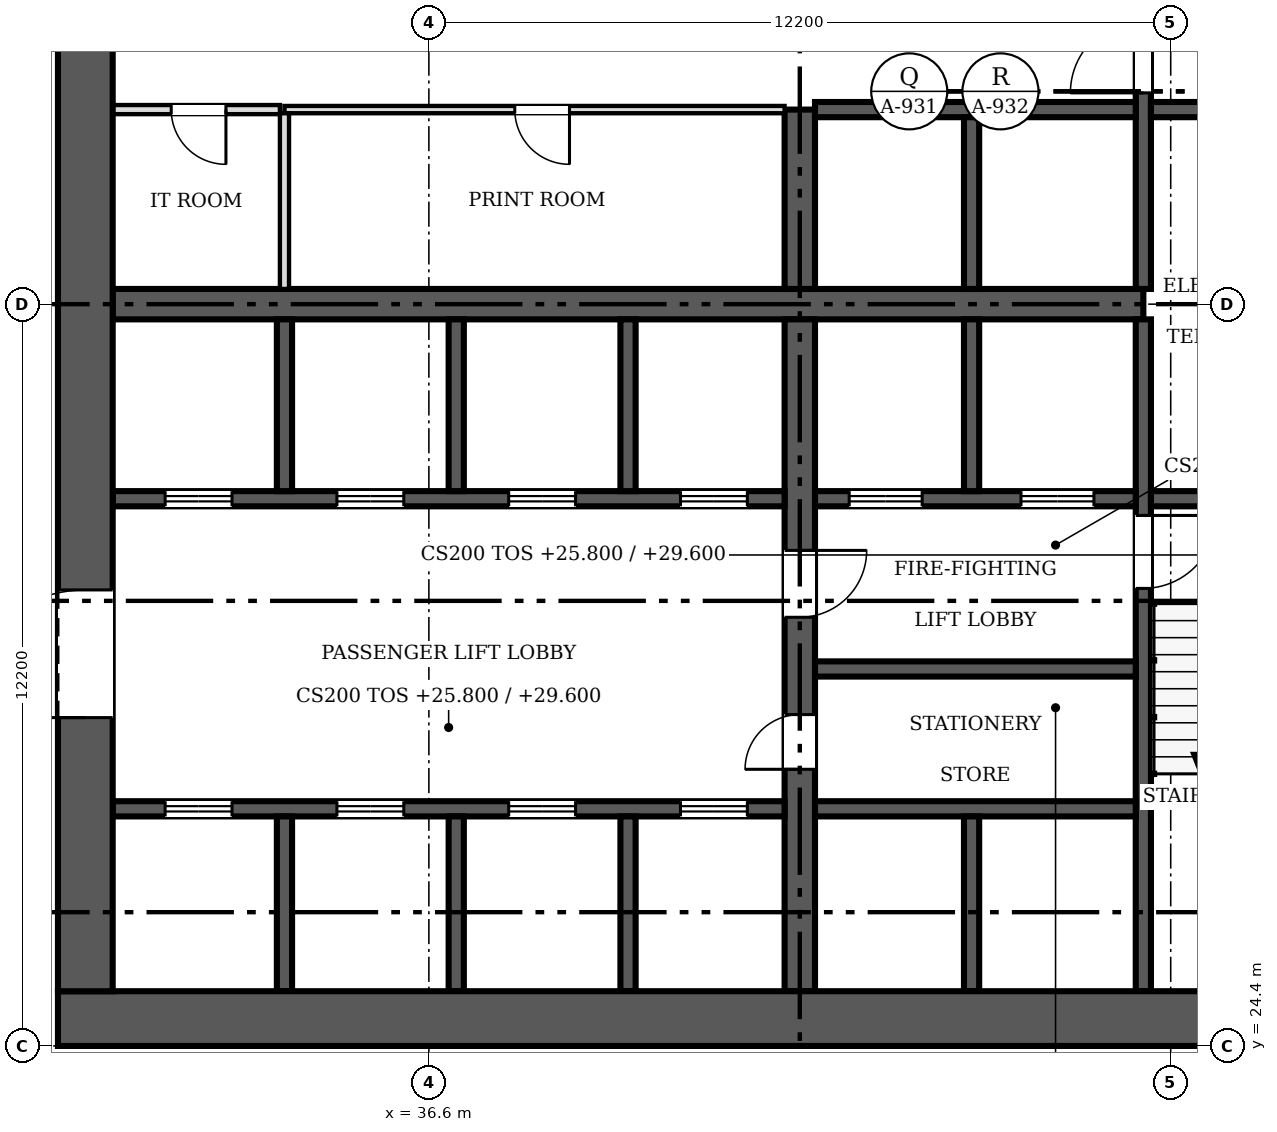
"""IFC4 building model, lengths in metres.
Left out: names, types, materials, properties, quantities, classifications, styles, units other than length and angle.
Written with IfcOpenShell. Run it as: python <this file> out.ifc"""

import sys

from ifc_helpers import new_model, si_unit, direction, frame, frame_2d, origin, place, context, subcontext, project, spatial, rectangle, extrude, source, transform, mapped, element, fill, save


model = new_model("IFC4")
c1 = context("Model", 3, precision=1e-05, world=origin(), true_north=direction((0.0, 1.0)))
c2 = subcontext(c1, "Body", "Model", "MODEL_VIEW")
j1 = project(units=[si_unit("LENGTHUNIT", "METRE"), si_unit("PLANEANGLEUNIT", "RADIAN")], contexts=[c1])
p1 = place(None, origin())
s1 = spatial("IfcSite", under=j1, at=p1, CompositionType="ELEMENT")
p2 = place(p1, origin())
s2 = spatial("IfcBuilding", under=s1, at=p2, CompositionType="ELEMENT")
p3 = place(p2, frame((0.0, 0.0, 25.8)))
s3 = spatial("IfcBuildingStorey", under=s2, at=p3, CompositionType="ELEMENT", Elevation=25.8)
p4 = place(p3, frame((54.9, 24.85, 0.0), z_axis=(0.0, 0.0, 1.0), x_axis=(-1.0, 0.0, 0.0)))
e1 = element("IfcWall", 1, at=p4, inside=s3, PredefinedType="SHEAR", context=c2, shape_type="SweptSolid", body=[
    extrude(rectangle(XDim=24.4, YDim=0.9, at=frame_2d((12.2, 0.0))), origin(), (0.0, 0.0, 1.0), 3.8),
])
m1 = source(origin(), c2, "Body", "SweptSolid", [
    extrude(rectangle(XDim=1.2, YDim=2.1, at=frame_2d((0.6, 1.05))), frame((0.0, 0.46, 0.0), z_axis=(0.0, -1.0, 0.0), x_axis=(1.0, 0.0, 0.0)), (0.0, 0.0, 1.0), 0.92),
])
p5 = place(p4, frame((1.5, 0.0, 0.0)))
e2 = element("IfcOpeningElement", 2, at=p5, cuts=e1, PredefinedType="OPENING", context=c2, shape_type="MappedRepresentation", body=[
    mapped(m1, transform((0.0, 0.0, 0.0), scale=1.0)),
])
p6 = place(p3, frame((30.95, 25.3, 0.0), z_axis=(0.0, 0.0, 1.0), x_axis=(0.0, 1.0, 0.0)))
e3 = element("IfcWall", 3, at=p6, inside=s3, PredefinedType="SHEAR", context=c2, shape_type="SweptSolid", body=[
    extrude(rectangle(XDim=22.6, YDim=0.9, at=frame_2d((11.3, 0.0))), origin(), (0.0, 0.0, 1.0), 3.8),
])
m2 = source(origin(), c2, "Body", "SweptSolid", [
    extrude(rectangle(XDim=2.1, YDim=2.4, at=frame_2d((1.05, 1.2))), frame((0.0, 0.46, 0.0), z_axis=(0.0, -1.0, 0.0), x_axis=(1.0, 0.0, 0.0)), (0.0, 0.0, 1.0), 0.92),
])
p7 = place(p6, frame((4.5, 0.0, 0.0)))
e4 = element("IfcOpeningElement", 4, at=p7, cuts=e3, PredefinedType="OPENING", context=c2, shape_type="MappedRepresentation", body=[
    mapped(m2, transform((0.0, 0.0, 0.0), scale=1.0)),
])
p8 = place(p6, frame((16.0, 0.0, 0.0)))
e5 = element("IfcOpeningElement", 5, at=p8, cuts=e3, PredefinedType="OPENING", context=c2, shape_type="MappedRepresentation", body=[
    mapped(m2, transform((0.0, 0.0, 0.0), scale=1.0)),
])
p9 = place(p3, frame((31.4, 36.6, 0.0), z_axis=(0.0, 0.0, 1.0), x_axis=(1.0, 0.0, 0.0)))
e6 = element("IfcWall", 6, at=p9, inside=s3, PredefinedType="SHEAR", context=c2, shape_type="SweptSolid", body=[
    extrude(rectangle(XDim=16.95, YDim=0.5, at=frame_2d((8.475, 0.0))), origin(), (0.0, 0.0, 1.0), 3.8),
])
p10 = place(p3, frame((42.7, 36.35, 0.0), z_axis=(0.0, 0.0, 1.0), x_axis=(0.0, -1.0, 0.0)))
e7 = element("IfcWall", 7, at=p10, inside=s3, PredefinedType="SHEAR", context=c2, shape_type="SweptSolid", body=[
    extrude(rectangle(XDim=11.05, YDim=0.5, at=frame_2d((5.525, 0.0))), origin(), (0.0, 0.0, 1.0), 3.8),
])
m3 = source(origin(), c2, "Body", "SweptSolid", [
    extrude(rectangle(XDim=0.9, YDim=2.1, at=frame_2d((0.45, 1.05))), frame((0.0, 0.26, 0.0), z_axis=(0.0, -1.0, 0.0), x_axis=(1.0, 0.0, 0.0)), (0.0, 0.0, 1.0), 0.52),
])
p11 = place(p10, frame((6.5, 0.0, 0.0)))
e8 = element("IfcOpeningElement", 8, at=p11, cuts=e7, PredefinedType="OPENING", context=c2, shape_type="MappedRepresentation", body=[
    mapped(m3, transform((0.0, 0.0, 0.0), scale=1.0)),
])
m4 = source(origin(), c2, "Body", "SweptSolid", [
    extrude(rectangle(XDim=1.1, YDim=2.1, at=frame_2d((0.55, 1.05))), frame((0.0, 0.26, 0.0), z_axis=(0.0, -1.0, 0.0), x_axis=(1.0, 0.0, 0.0)), (0.0, 0.0, 1.0), 0.52),
])
p12 = place(p10, frame((3.8, 0.0, 0.0)))
e9 = element("IfcOpeningElement", 9, at=p12, cuts=e7, PredefinedType="OPENING", context=c2, shape_type="MappedRepresentation", body=[
    mapped(m4, transform((0.0, 0.0, 0.0), scale=1.0)),
])
p13 = place(p3, frame((42.7, 36.85, 0.0), z_axis=(0.0, 0.0, 1.0), x_axis=(0.0, 1.0, 0.0)))
e10 = element("IfcWall", 10, at=p13, inside=s3, PredefinedType="SHEAR", context=c2, shape_type="SweptSolid", body=[
    extrude(rectangle(XDim=2.95, YDim=0.5, at=frame_2d((1.475, 0.0))), origin(), (0.0, 0.0, 1.0), 3.8),
])
p14 = place(p3, frame((48.35, 36.35, 0.0), z_axis=(0.0, 0.0, 1.0), x_axis=(0.0, -1.0, 0.0)))
e11 = element("IfcWall", 11, at=p14, inside=s3, PredefinedType="SOLIDWALL", context=c2, shape_type="SweptSolid", body=[
    extrude(rectangle(XDim=11.05, YDim=0.25, at=frame_2d((5.525, 0.0))), origin(), (0.0, 0.0, 1.0), 3.8),
])
m5 = source(origin(), c2, "Body", "SweptSolid", [
    extrude(rectangle(XDim=1.2, YDim=2.1, at=frame_2d((0.6, 1.05))), frame((0.0, 0.135, 0.0), z_axis=(0.0, -1.0, 0.0), x_axis=(1.0, 0.0, 0.0)), (0.0, 0.0, 1.0), 0.27),
])
p15 = place(p14, frame((3.225, 0.0, 0.0)))
e12 = element("IfcOpeningElement", 12, at=p15, cuts=e11, PredefinedType="OPENING", context=c2, shape_type="MappedRepresentation", body=[
    mapped(m5, transform((0.0, 0.0, 0.0), scale=1.0)),
])
p16 = place(p3, frame((48.35, 47.9, 0.0), z_axis=(0.0, 0.0, 1.0), x_axis=(0.0, -1.0, 0.0)))
e13 = element("IfcWall", 13, at=p16, inside=s3, PredefinedType="SOLIDWALL", context=c2, shape_type="SweptSolid", body=[
    extrude(rectangle(XDim=11.05, YDim=0.25, at=frame_2d((5.525, 0.0))), origin(), (0.0, 0.0, 1.0), 3.8),
])
p17 = place(p16, frame((6.625, 0.0, 0.0)))
e14 = element("IfcOpeningElement", 14, at=p17, cuts=e13, PredefinedType="OPENING", context=c2, shape_type="MappedRepresentation", body=[
    mapped(m5, transform((0.0, 0.0, 0.0), scale=1.0)),
])
p18 = place(p3, frame((42.45, 33.4, 0.0), z_axis=(0.0, 0.0, 1.0), x_axis=(-1.0, 0.0, 0.0)))
e15 = element("IfcWall", 15, at=p18, inside=s3, PredefinedType="SOLIDWALL", context=c2, shape_type="SweptSolid", body=[
    extrude(rectangle(XDim=11.05, YDim=0.25, at=frame_2d((5.525, 0.0))), origin(), (0.0, 0.0, 1.0), 3.8),
])
m6 = source(origin(), c2, "Body", "SweptSolid", [
    extrude(rectangle(XDim=1.1, YDim=2.1, at=frame_2d((0.55, 1.05))), frame((0.0, 0.135, 0.0), z_axis=(0.0, -1.0, 0.0), x_axis=(1.0, 0.0, 0.0)), (0.0, 0.0, 1.0), 0.27),
])
p19 = place(p18, frame((9.087, 0.0, 0.0)))
e16 = element("IfcOpeningElement", 16, at=p19, cuts=e15, PredefinedType="OPENING", context=c2, shape_type="MappedRepresentation", body=[
    mapped(m6, transform((0.0, 0.0, 0.0), scale=1.0)),
])
p20 = place(p18, frame((6.262, 0.0, 0.0)))
e17 = element("IfcOpeningElement", 17, at=p20, cuts=e15, PredefinedType="OPENING", context=c2, shape_type="MappedRepresentation", body=[
    mapped(m6, transform((0.0, 0.0, 0.0), scale=1.0)),
])
p21 = place(p18, frame((3.438, 0.0, 0.0)))
e18 = element("IfcOpeningElement", 18, at=p21, cuts=e15, PredefinedType="OPENING", context=c2, shape_type="MappedRepresentation", body=[
    mapped(m6, transform((0.0, 0.0, 0.0), scale=1.0)),
])
p22 = place(p18, frame((0.613, 0.0, 0.0)))
e19 = element("IfcOpeningElement", 19, at=p22, cuts=e15, PredefinedType="OPENING", context=c2, shape_type="MappedRepresentation", body=[
    mapped(m6, transform((0.0, 0.0, 0.0), scale=1.0)),
])
p23 = place(p3, frame((48.225, 33.4, 0.0), z_axis=(0.0, 0.0, 1.0), x_axis=(-1.0, 0.0, 0.0)))
e20 = element("IfcWall", 20, at=p23, inside=s3, PredefinedType="SOLIDWALL", context=c2, shape_type="SweptSolid", body=[
    extrude(rectangle(XDim=5.275, YDim=0.25, at=frame_2d((2.638, 0.0))), origin(), (0.0, 0.0, 1.0), 3.8),
])
p24 = place(p23, frame((3.512, 0.0, 0.0)))
e21 = element("IfcOpeningElement", 21, at=p24, cuts=e20, PredefinedType="OPENING", context=c2, shape_type="MappedRepresentation", body=[
    mapped(m5, transform((0.0, 0.0, 0.0), scale=1.0)),
])
p25 = place(p23, frame((0.688, 0.0, 0.0)))
e22 = element("IfcOpeningElement", 22, at=p25, cuts=e20, PredefinedType="OPENING", context=c2, shape_type="MappedRepresentation", body=[
    mapped(m5, transform((0.0, 0.0, 0.0), scale=1.0)),
])
p26 = place(p3, frame((48.475, 33.4, 0.0), z_axis=(0.0, 0.0, 1.0), x_axis=(1.0, 0.0, 0.0)))
e23 = element("IfcWall", 23, at=p26, inside=s3, PredefinedType="SOLIDWALL", context=c2, shape_type="SweptSolid", body=[
    extrude(rectangle(XDim=3.525, YDim=0.25, at=frame_2d((1.762, 0.0))), origin(), (0.0, 0.0, 1.0), 3.8),
])
p27 = place(p3, frame((31.4, 28.3, 0.0), z_axis=(0.0, 0.0, 1.0), x_axis=(1.0, 0.0, 0.0)))
e24 = element("IfcWall", 24, at=p27, inside=s3, PredefinedType="SOLIDWALL", context=c2, shape_type="SweptSolid", body=[
    extrude(rectangle(XDim=11.05, YDim=0.25, at=frame_2d((5.525, 0.0))), origin(), (0.0, 0.0, 1.0), 3.8),
])
p28 = place(p27, frame((0.863, 0.0, 0.0)))
e25 = element("IfcOpeningElement", 25, at=p28, cuts=e24, PredefinedType="OPENING", context=c2, shape_type="MappedRepresentation", body=[
    mapped(m6, transform((0.0, 0.0, 0.0), scale=1.0)),
])
p29 = place(p27, frame((3.688, 0.0, 0.0)))
e26 = element("IfcOpeningElement", 26, at=p29, cuts=e24, PredefinedType="OPENING", context=c2, shape_type="MappedRepresentation", body=[
    mapped(m6, transform((0.0, 0.0, 0.0), scale=1.0)),
])
p30 = place(p27, frame((6.512, 0.0, 0.0)))
e27 = element("IfcOpeningElement", 27, at=p30, cuts=e24, PredefinedType="OPENING", context=c2, shape_type="MappedRepresentation", body=[
    mapped(m6, transform((0.0, 0.0, 0.0), scale=1.0)),
])
p31 = place(p27, frame((9.337, 0.0, 0.0)))
e28 = element("IfcOpeningElement", 28, at=p31, cuts=e24, PredefinedType="OPENING", context=c2, shape_type="MappedRepresentation", body=[
    mapped(m6, transform((0.0, 0.0, 0.0), scale=1.0)),
])
for number, where, z_axis, x_axis in (
    (29, (42.95, 28.3, 0.0), (0.0, 0.0, 1.0), (1.0, 0.0, 0.0)),
    (30, (42.95, 39.8, 0.0), (0.0, 0.0, 1.0), (1.0, 0.0, 0.0)),
):
    element("IfcWall", number, at=place(p3, frame(where, z_axis=z_axis, x_axis=x_axis)), inside=s3, PredefinedType="SOLIDWALL", context=c2, shape_type="SweptSolid", body=[
        extrude(rectangle(XDim=5.275, YDim=0.25, at=frame_2d((2.638, 0.0))), origin(), (0.0, 0.0, 1.0), 3.8),
    ])
p32 = place(p3, frame((48.475, 39.8, 0.0), z_axis=(0.0, 0.0, 1.0), x_axis=(1.0, 0.0, 0.0)))
e31 = element("IfcWall", 31, at=p32, inside=s3, PredefinedType="SOLIDWALL", context=c2, shape_type="SweptSolid", body=[
    extrude(rectangle(XDim=3.525, YDim=0.25, at=frame_2d((1.762, 0.0))), origin(), (0.0, 0.0, 1.0), 3.8),
])
p33 = place(p3, frame((45.525, 33.525, 0.0), z_axis=(0.0, 0.0, 1.0), x_axis=(0.0, 1.0, 0.0)))
e32 = element("IfcWall", 32, at=p33, inside=s3, PredefinedType="SOLIDWALL", context=c2, shape_type="SweptSolid", body=[
    extrude(rectangle(XDim=2.825, YDim=0.25, at=frame_2d((1.413, 0.0))), origin(), (0.0, 0.0, 1.0), 3.8),
])
p34 = place(p3, frame((45.525, 36.85, 0.0), z_axis=(0.0, 0.0, 1.0), x_axis=(0.0, 1.0, 0.0)))
e33 = element("IfcWall", 33, at=p34, inside=s3, PredefinedType="SOLIDWALL", context=c2, shape_type="SweptSolid", body=[
    extrude(rectangle(XDim=2.825, YDim=0.25, at=frame_2d((1.413, 0.0))), origin(), (0.0, 0.0, 1.0), 3.8),
])
p35 = place(p3, frame((42.95, 30.6, 0.0), z_axis=(0.0, 0.0, 1.0), x_axis=(1.0, 0.0, 0.0)))
e34 = element("IfcWall", 34, at=p35, inside=s3, PredefinedType="SOLIDWALL", context=c2, shape_type="SweptSolid", body=[
    extrude(rectangle(XDim=5.275, YDim=0.25, at=frame_2d((2.638, 0.0))), origin(), (0.0, 0.0, 1.0), 3.8),
])
for number, where, z_axis, x_axis in (
    (35, (34.225, 33.525, 0.0), (0.0, 0.0, 1.0), (0.0, 1.0, 0.0)),
    (36, (37.05, 33.525, 0.0), (0.0, 0.0, 1.0), (0.0, 1.0, 0.0)),
    (37, (39.875, 33.525, 0.0), (0.0, 0.0, 1.0), (0.0, 1.0, 0.0)),
):
    element("IfcWall", number, at=place(p3, frame(where, z_axis=z_axis, x_axis=x_axis)), inside=s3, PredefinedType="SOLIDWALL", context=c2, shape_type="SweptSolid", body=[
        extrude(rectangle(XDim=2.825, YDim=0.25, at=frame_2d((1.413, 0.0))), origin(), (0.0, 0.0, 1.0), 3.8),
    ])
for number, where, z_axis, x_axis in (
    (38, (34.225, 25.3, 0.0), (0.0, 0.0, 1.0), (0.0, 1.0, 0.0)),
    (39, (37.05, 25.3, 0.0), (0.0, 0.0, 1.0), (0.0, 1.0, 0.0)),
    (40, (39.875, 25.3, 0.0), (0.0, 0.0, 1.0), (0.0, 1.0, 0.0)),
    (41, (45.525, 25.3, 0.0), (0.0, 0.0, 1.0), (0.0, 1.0, 0.0)),
):
    element("IfcWall", number, at=place(p3, frame(where, z_axis=z_axis, x_axis=x_axis)), inside=s3, PredefinedType="SOLIDWALL", context=c2, shape_type="SweptSolid", body=[
        extrude(rectangle(XDim=2.875, YDim=0.25, at=frame_2d((1.438, 0.0))), origin(), (0.0, 0.0, 1.0), 3.8),
    ])
p36 = place(p3, frame((42.45, 39.8, 0.0), z_axis=(0.0, 0.0, 1.0), x_axis=(-1.0, 0.0, 0.0)))
e42 = element("IfcWall", 42, at=p36, inside=s3, PredefinedType="PARTITIONING", context=c2, shape_type="SweptSolid", body=[
    extrude(rectangle(XDim=8.225, YDim=0.12, at=frame_2d((4.112, 0.0))), origin(), (0.0, 0.0, 1.0), 3.6),
])
m7 = source(origin(), c2, "Body", "SweptSolid", [
    extrude(rectangle(XDim=0.9, YDim=2.1, at=frame_2d((0.45, 1.05))), frame((0.0, 0.07, 0.0), z_axis=(0.0, -1.0, 0.0), x_axis=(1.0, 0.0, 0.0)), (0.0, 0.0, 1.0), 0.14),
])
p37 = place(p36, frame((3.538, 0.0, 0.0)))
e43 = element("IfcOpeningElement", 43, at=p37, cuts=e42, PredefinedType="OPENING", context=c2, shape_type="MappedRepresentation", body=[
    mapped(m7, transform((0.0, 0.0, 0.0), scale=1.0)),
])
p38 = place(p3, frame((34.225, 36.85, 0.0), z_axis=(0.0, 0.0, 1.0), x_axis=(0.0, 1.0, 0.0)))
e44 = element("IfcWall", 44, at=p38, inside=s3, PredefinedType="PARTITIONING", context=c2, shape_type="SweptSolid", body=[
    extrude(rectangle(XDim=2.89, YDim=0.15, at=frame_2d((1.445, 0.0))), origin(), (0.0, 0.0, 1.0), 3.6),
])
p39 = place(p3, frame((34.15, 39.8, 0.0), z_axis=(0.0, 0.0, 1.0), x_axis=(-1.0, 0.0, 0.0)))
e45 = element("IfcWall", 45, at=p39, inside=s3, PredefinedType="PARTITIONING", context=c2, shape_type="SweptSolid", body=[
    extrude(rectangle(XDim=2.75, YDim=0.15, at=frame_2d((1.375, 0.0))), origin(), (0.0, 0.0, 1.0), 3.6),
])
m8 = source(origin(), c2, "Body", "SweptSolid", [
    extrude(rectangle(XDim=0.9, YDim=2.1, at=frame_2d((0.45, 1.05))), frame((0.0, 0.085, 0.0), z_axis=(0.0, -1.0, 0.0), x_axis=(1.0, 0.0, 0.0)), (0.0, 0.0, 1.0), 0.17),
])
p40 = place(p39, frame((0.887, 0.0, 0.0)))
e46 = element("IfcOpeningElement", 46, at=p40, cuts=e45, PredefinedType="OPENING", context=c2, shape_type="MappedRepresentation", body=[
    mapped(m8, transform((0.0, 0.0, 0.0), scale=1.0)),
])
m9 = source(origin(), c2, "Body", "SweptSolid", [
    extrude(rectangle(XDim=2.1, YDim=2.4, at=frame_2d((1.05, 1.2))), frame((0.0, 0.025, 0.0), z_axis=(0.0, -1.0, 0.0), x_axis=(1.0, 0.0, 0.0)), (0.0, 0.0, 1.0), 0.05),
])
p41 = place(p7, origin())
e47 = element("IfcDoor", 47, at=p41, inside=s3, OperationType="DOUBLE_DOOR_SINGLE_SWING", PredefinedType="DOOR", context=c2, shape_type="MappedRepresentation", body=[
    mapped(m9, transform((0.0, 0.0, 0.0), scale=1.0)),
])
fill(e4, e47)
m10 = source(origin(), c2, "Body", "SweptSolid", [
    extrude(rectangle(XDim=0.9, YDim=2.1, at=frame_2d((0.45, 1.05))), frame((0.0, 0.025, 0.0), z_axis=(0.0, -1.0, 0.0), x_axis=(1.0, 0.0, 0.0)), (0.0, 0.0, 1.0), 0.05),
])
p42 = place(p11, origin())
e48 = element("IfcDoor", 48, at=p42, inside=s3, OperationType="SINGLE_SWING_RIGHT", PredefinedType="DOOR", context=c2, shape_type="MappedRepresentation", body=[
    mapped(m10, transform((0.0, 0.0, 0.0), scale=1.0)),
])
fill(e8, e48)
m11 = source(origin(), c2, "Body", "SweptSolid", [
    extrude(rectangle(XDim=1.1, YDim=2.1, at=frame_2d((0.55, 1.05))), frame((0.0, 0.025, 0.0), z_axis=(0.0, -1.0, 0.0), x_axis=(1.0, 0.0, 0.0)), (0.0, 0.0, 1.0), 0.05),
])
p43 = place(p12, origin())
e49 = element("IfcDoor", 49, at=p43, inside=s3, OperationType="SINGLE_SWING_LEFT", PredefinedType="DOOR", context=c2, shape_type="MappedRepresentation", body=[
    mapped(m11, transform((0.0, 0.0, 0.0), scale=1.0)),
])
fill(e9, e49)
m12 = source(origin(), c2, "Body", "SweptSolid", [
    extrude(rectangle(XDim=1.2, YDim=2.1, at=frame_2d((0.6, 1.05))), frame((0.0, 0.025, 0.0), z_axis=(0.0, -1.0, 0.0), x_axis=(1.0, 0.0, 0.0)), (0.0, 0.0, 1.0), 0.05),
])
p44 = place(p15, origin())
e50 = element("IfcDoor", 50, at=p44, inside=s3, OperationType="SINGLE_SWING_LEFT", PredefinedType="DOOR", context=c2, shape_type="MappedRepresentation", body=[
    mapped(m12, transform((0.0, 0.0, 0.0), scale=1.0)),
])
fill(e12, e50)
p45 = place(p17, origin())
e51 = element("IfcDoor", 51, at=p45, inside=s3, OperationType="SINGLE_SWING_RIGHT", PredefinedType="DOOR", context=c2, shape_type="MappedRepresentation", body=[
    mapped(m12, transform((0.0, 0.0, 0.0), scale=1.0)),
])
fill(e14, e51)
p46 = place(p19, origin())
e52 = element("IfcDoor", 52, at=p46, inside=s3, OperationType="DOUBLE_DOOR_SLIDING", PredefinedType="DOOR", context=c2, shape_type="MappedRepresentation", body=[
    mapped(m11, transform((0.0, 0.0, 0.0), scale=1.0)),
])
fill(e16, e52)
p47 = place(p20, origin())
e53 = element("IfcDoor", 53, at=p47, inside=s3, OperationType="DOUBLE_DOOR_SLIDING", PredefinedType="DOOR", context=c2, shape_type="MappedRepresentation", body=[
    mapped(m11, transform((0.0, 0.0, 0.0), scale=1.0)),
])
fill(e17, e53)
p48 = place(p21, origin())
e54 = element("IfcDoor", 54, at=p48, inside=s3, OperationType="DOUBLE_DOOR_SLIDING", PredefinedType="DOOR", context=c2, shape_type="MappedRepresentation", body=[
    mapped(m11, transform((0.0, 0.0, 0.0), scale=1.0)),
])
fill(e18, e54)
p49 = place(p22, origin())
e55 = element("IfcDoor", 55, at=p49, inside=s3, OperationType="DOUBLE_DOOR_SLIDING", PredefinedType="DOOR", context=c2, shape_type="MappedRepresentation", body=[
    mapped(m11, transform((0.0, 0.0, 0.0), scale=1.0)),
])
fill(e19, e55)
p50 = place(p24, origin())
e56 = element("IfcDoor", 56, at=p50, inside=s3, OperationType="DOUBLE_DOOR_SLIDING", PredefinedType="DOOR", context=c2, shape_type="MappedRepresentation", body=[
    mapped(m12, transform((0.0, 0.0, 0.0), scale=1.0)),
])
fill(e21, e56)
p51 = place(p25, origin())
e57 = element("IfcDoor", 57, at=p51, inside=s3, OperationType="DOUBLE_DOOR_SLIDING", PredefinedType="DOOR", context=c2, shape_type="MappedRepresentation", body=[
    mapped(m12, transform((0.0, 0.0, 0.0), scale=1.0)),
])
fill(e22, e57)
p52 = place(p28, origin())
e58 = element("IfcDoor", 58, at=p52, inside=s3, OperationType="DOUBLE_DOOR_SLIDING", PredefinedType="DOOR", context=c2, shape_type="MappedRepresentation", body=[
    mapped(m11, transform((0.0, 0.0, 0.0), scale=1.0)),
])
fill(e25, e58)
p53 = place(p29, origin())
e59 = element("IfcDoor", 59, at=p53, inside=s3, OperationType="DOUBLE_DOOR_SLIDING", PredefinedType="DOOR", context=c2, shape_type="MappedRepresentation", body=[
    mapped(m11, transform((0.0, 0.0, 0.0), scale=1.0)),
])
fill(e26, e59)
p54 = place(p30, origin())
e60 = element("IfcDoor", 60, at=p54, inside=s3, OperationType="DOUBLE_DOOR_SLIDING", PredefinedType="DOOR", context=c2, shape_type="MappedRepresentation", body=[
    mapped(m11, transform((0.0, 0.0, 0.0), scale=1.0)),
])
fill(e27, e60)
p55 = place(p31, origin())
e61 = element("IfcDoor", 61, at=p55, inside=s3, OperationType="DOUBLE_DOOR_SLIDING", PredefinedType="DOOR", context=c2, shape_type="MappedRepresentation", body=[
    mapped(m11, transform((0.0, 0.0, 0.0), scale=1.0)),
])
fill(e28, e61)
p56 = place(p37, origin())
e62 = element("IfcDoor", 62, at=p56, inside=s3, OperationType="SINGLE_SWING_LEFT", PredefinedType="DOOR", context=c2, shape_type="MappedRepresentation", body=[
    mapped(m10, transform((0.0, 0.0, 0.0), scale=1.0)),
])
fill(e43, e62)
p57 = place(p40, origin())
e63 = element("IfcDoor", 63, at=p57, inside=s3, OperationType="SINGLE_SWING_LEFT", PredefinedType="DOOR", context=c2, shape_type="MappedRepresentation", body=[
    mapped(m10, transform((0.0, 0.0, 0.0), scale=1.0)),
])
fill(e46, e63)
save(model, sys.argv[1])
